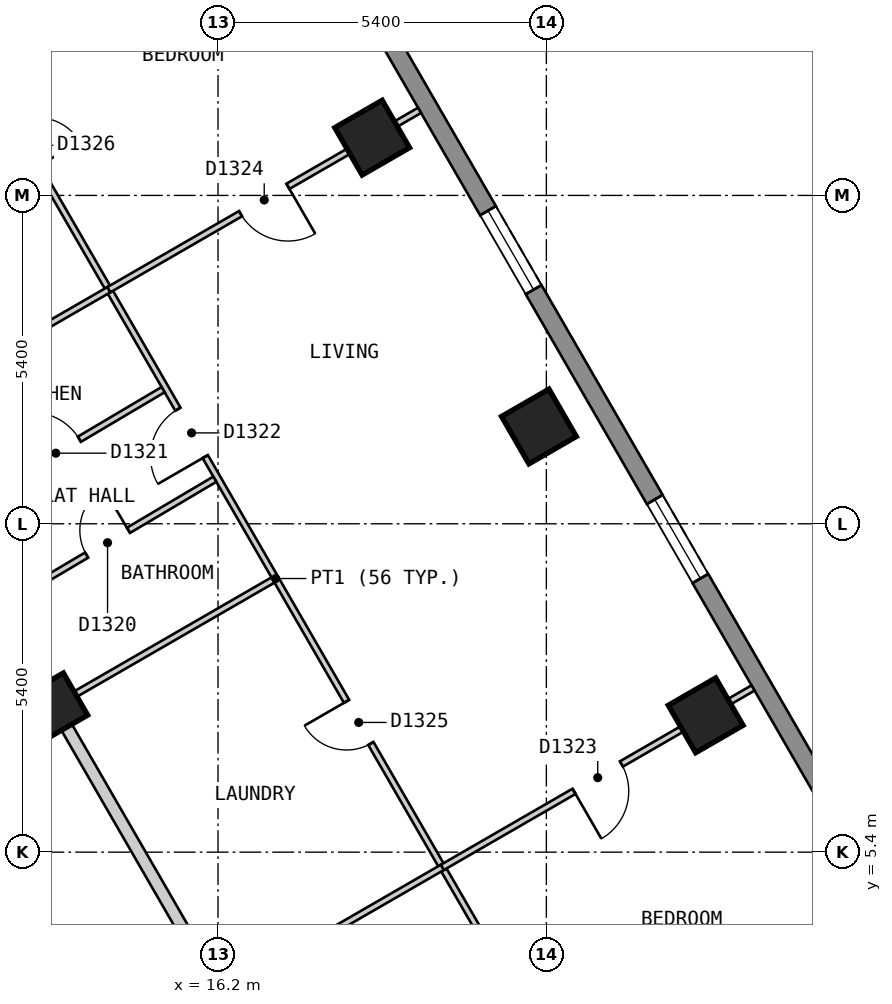
"""IFC4 building model, lengths in metres.
Left out: names, types, materials, properties, quantities, classifications, styles, units other than length and angle.
Written with IfcOpenShell. Run it as: python <this file> out.ifc"""

import sys

from ifc_helpers import new_model, si_unit, direction, frame, frame_2d, origin, origin_2d, place, context, subcontext, project, spatial, polyline, rectangle, outline, extrude, element, fill, save


model = new_model("IFC4")
c1 = context("Model", 3, precision=1e-05, world=origin(), true_north=direction((0.0, 1.0)))
c2 = subcontext(c1, "Body", "Model", "MODEL_VIEW")
j1 = project(units=[si_unit("LENGTHUNIT", "METRE"), si_unit("PLANEANGLEUNIT", "RADIAN")], contexts=[c1])
p1 = place(None, origin())
s1 = spatial("IfcSite", under=j1, at=p1, CompositionType="ELEMENT")
p2 = place(p1, origin())
s2 = spatial("IfcBuilding", under=s1, at=p2, CompositionType="ELEMENT")
p3 = place(p2, frame((0.0, 0.0, 147.6)))
s3 = spatial("IfcBuildingStorey", under=s2, at=p3, CompositionType="ELEMENT", Elevation=147.6)
for number, where, z_axis, x_axis in (
    (1, (24.22, 7.65, 0.0), (0.0, 0.0, 1.0), (-0.5, 0.866, 0.0)),
    (2, (21.478, 12.4, 0.0), (0.0, 0.0, 1.0), (-0.5, 0.866, 0.0)),
    (3, (18.735, 17.15, 0.0), (0.0, 0.0, 1.0), (-0.5, 0.866, 0.0)),
):
    element("IfcColumn", number, at=place(p3, frame(where, z_axis=z_axis, x_axis=x_axis)), inside=s3, PredefinedType="COLUMN", context=c2, shape_type="SweptSolid", body=[
        extrude(rectangle(XDim=0.9, YDim=0.9, at=origin_2d()), origin(), (0.0, 0.0, 1.0), 3.0),
    ])
p4 = place(p3, frame((13.51, 7.8, 0.0), z_axis=(0.0, 0.0, 1.0), x_axis=(-0.5, 0.866025403784, 0.0)))
e4 = element("IfcColumn", 4, at=p4, inside=s3, PredefinedType="COLUMN", context=c2, shape_type="SweptSolid", body=[
    extrude(rectangle(XDim=0.8, YDim=0.8, at=origin_2d()), origin(), (0.0, 0.0, 1.0), 3.0),
])
p5 = place(p3, frame((28.218, 2.825, 0.0), z_axis=(0.0, 0.0, 1.0), x_axis=(-0.500020536353, 0.866013546791, 0.0)))
e5 = element("IfcWall", 5, at=p5, inside=s3, PredefinedType="SOLIDWALL", context=c2, shape_type="SweptSolid", body=[
    extrude(outline(polyline([(0.0, -0.15), (23.325, -0.15), (23.245, 0.15), (0.08, 0.15), (0.0, -0.15)])), origin(), (0.0, 0.0, 1.0), 2.7),
])
p6 = place(p5, frame((2.685, 0.0, 0.15)))
e6 = element("IfcOpeningElement", 6, at=p6, cuts=e5, PredefinedType="OPENING", context=c2, shape_type="SweptSolid", body=[
    extrude(rectangle(XDim=1.5, YDim=2.1, at=frame_2d((0.75, 1.05))), frame((0.0, 0.16, 0.0), z_axis=(0.0, -1.0, 0.0), x_axis=(1.0, 0.0, 0.0)), (0.0, 0.0, 1.0), 0.32),
])
p7 = place(p5, frame((8.17, 0.0, 0.15)))
e7 = element("IfcOpeningElement", 7, at=p7, cuts=e5, PredefinedType="OPENING", context=c2, shape_type="SweptSolid", body=[
    extrude(rectangle(XDim=1.5, YDim=2.1, at=frame_2d((0.75, 1.05))), frame((0.0, 0.16, 0.0), z_axis=(0.0, -1.0, 0.0), x_axis=(1.0, 0.0, 0.0)), (0.0, 0.0, 1.0), 0.32),
])
p8 = place(p5, frame((13.655, 0.0, 0.15)))
e8 = element("IfcOpeningElement", 8, at=p8, cuts=e5, PredefinedType="OPENING", context=c2, shape_type="SweptSolid", body=[
    extrude(rectangle(XDim=1.5, YDim=2.1, at=frame_2d((0.75, 1.05))), frame((0.0, 0.16, 0.0), z_axis=(0.0, -1.0, 0.0), x_axis=(1.0, 0.0, 0.0)), (0.0, 0.0, 1.0), 0.32),
])
p9 = place(p5, frame((19.14, 0.0, 0.15)))
e9 = element("IfcOpeningElement", 9, at=p9, cuts=e5, PredefinedType="OPENING", context=c2, shape_type="SweptSolid", body=[
    extrude(rectangle(XDim=1.5, YDim=2.1, at=frame_2d((0.75, 1.05))), frame((0.0, 0.16, 0.0), z_axis=(0.0, -1.0, 0.0), x_axis=(1.0, 0.0, 0.0)), (0.0, 0.0, 1.0), 0.32),
])
p10 = place(p3, frame((7.967, 13.0, 0.0), z_axis=(0.0, 0.0, 1.0), x_axis=(0.50003774998, -0.866003607726, 0.0)))
e10 = element("IfcWall", 10, at=p10, inside=s3, PredefinedType="PARTITIONING", context=c2, shape_type="SweptSolid", body=[
    extrude(rectangle(XDim=14.433, YDim=0.2, at=frame_2d((7.217, 0.0))), origin(), (0.0, 0.0, 1.0), 2.7),
])
p11 = place(p10, frame((6.824, 0.0, 0.0)))
e11 = element("IfcOpeningElement", 11, at=p11, cuts=e10, PredefinedType="OPENING", context=c2, shape_type="SweptSolid", body=[
    extrude(rectangle(XDim=0.9, YDim=2.1, at=frame_2d((0.45, 1.05))), frame((0.0, 0.11, 0.0), z_axis=(0.0, -1.0, 0.0), x_axis=(1.0, 0.0, 0.0)), (0.0, 0.0, 1.0), 0.22),
])
p12 = place(p3, frame((9.296, 15.1, 0.0), z_axis=(0.0, 0.0, 1.0), x_axis=(0.499974024244, -0.866040400375, 0.0)))
e12 = element("IfcWall", 12, at=p12, inside=s3, PredefinedType="PARTITIONING", context=c2, shape_type="SweptSolid", body=[
    extrude(rectangle(XDim=16.857, YDim=0.2, at=frame_2d((8.429, 0.0))), origin(), (0.0, 0.0, 1.0), 2.7),
])
p13 = place(p12, frame((5.209, 0.0, 0.0)))
e13 = element("IfcOpeningElement", 13, at=p13, cuts=e12, PredefinedType="OPENING", context=c2, shape_type="SweptSolid", body=[
    extrude(rectangle(XDim=1.0, YDim=2.1, at=frame_2d((0.5, 1.05))), frame((0.0, 0.11, 0.0), z_axis=(0.0, -1.0, 0.0), x_axis=(1.0, 0.0, 0.0)), (0.0, 0.0, 1.0), 0.22),
])
p14 = place(p3, frame((11.713, 19.313, 0.0), z_axis=(0.0, 0.0, 1.0), x_axis=(0.499999523185, -0.866025679073, 0.0)))
e14 = element("IfcWall", 14, at=p14, inside=s3, PredefinedType="PARTITIONING", context=c2, shape_type="SweptSolid", body=[
    extrude(rectangle(XDim=21.738, YDim=0.1, at=frame_2d((10.869, 0.0))), origin(), (0.0, 0.0, 1.0), 2.7),
])
p15 = place(p14, frame((7.654, 0.0, 0.0)))
e15 = element("IfcOpeningElement", 15, at=p15, cuts=e14, PredefinedType="OPENING", context=c2, shape_type="SweptSolid", body=[
    extrude(rectangle(XDim=0.9, YDim=2.1, at=frame_2d((0.45, 1.05))), frame((0.0, 0.06, 0.0), z_axis=(0.0, -1.0, 0.0), x_axis=(1.0, 0.0, 0.0)), (0.0, 0.0, 1.0), 0.12),
])
p16 = place(p14, frame((13.202, 0.0, 0.0)))
e16 = element("IfcOpeningElement", 16, at=p16, cuts=e14, PredefinedType="OPENING", context=c2, shape_type="SweptSolid", body=[
    extrude(rectangle(XDim=0.8, YDim=2.1, at=frame_2d((0.4, 1.05))), frame((0.0, 0.06, 0.0), z_axis=(0.0, -1.0, 0.0), x_axis=(1.0, 0.0, 0.0)), (0.0, 0.0, 1.0), 0.12),
])
p17 = place(p14, frame((2.242, 0.0, 0.0)))
e17 = element("IfcOpeningElement", 17, at=p17, cuts=e14, PredefinedType="OPENING", context=c2, shape_type="SweptSolid", body=[
    extrude(rectangle(XDim=0.8, YDim=2.1, at=frame_2d((0.4, 1.05))), frame((0.0, 0.06, 0.0), z_axis=(0.0, -1.0, 0.0), x_axis=(1.0, 0.0, 0.0)), (0.0, 0.0, 1.0), 0.12),
])
p18 = place(p14, frame((18.696, 0.0, 0.0)))
e18 = element("IfcOpeningElement", 18, at=p18, cuts=e14, PredefinedType="OPENING", context=c2, shape_type="SweptSolid", body=[
    extrude(rectangle(XDim=0.8, YDim=2.1, at=frame_2d((0.4, 1.05))), frame((0.0, 0.06, 0.0), z_axis=(0.0, -1.0, 0.0), x_axis=(1.0, 0.0, 0.0)), (0.0, 0.0, 1.0), 0.12),
])
p19 = place(p3, frame((16.339, 3.1, 0.0), z_axis=(0.0, 0.0, 1.0), x_axis=(0.866050731258, 0.499956128963, 0.0)))
e19 = element("IfcWall", 19, at=p19, inside=s3, PredefinedType="PARTITIONING", context=c2, shape_type="SweptSolid", body=[
    extrude(rectangle(XDim=4.1, YDim=0.1, at=frame_2d((2.05, 0.0))), origin(), (0.0, 0.0, 1.0), 2.7),
])
p20 = place(p3, frame((13.597, 7.85, 0.0), z_axis=(0.0, 0.0, 1.0), x_axis=(0.866015917575, 0.500016430238, 0.0)))
e20 = element("IfcWall", 20, at=p20, inside=s3, PredefinedType="PARTITIONING", context=c2, shape_type="SweptSolid", body=[
    extrude(rectangle(XDim=4.05, YDim=0.1, at=frame_2d((2.025, 0.0))), origin(), (0.0, 0.0, 1.0), 2.7),
])
p21 = place(p3, frame((10.854, 12.6, 0.0), z_axis=(0.0, 0.0, 1.0), x_axis=(0.86606561423, 0.499930346997, 0.0)))
e21 = element("IfcWall", 21, at=p21, inside=s3, PredefinedType="PARTITIONING", context=c2, shape_type="SweptSolid", body=[
    extrude(rectangle(XDim=4.1, YDim=0.1, at=frame_2d((2.05, 0.0))), origin(), (0.0, 0.0, 1.0), 2.7),
])
p22 = place(p3, frame((11.812, 10.942, 0.0), z_axis=(0.0, 0.0, 1.0), x_axis=(0.860404104761, 0.509612378687, 0.0)))
e22 = element("IfcWall", 22, at=p22, inside=s3, PredefinedType="PARTITIONING", context=c2, shape_type="SweptSolid", body=[
    extrude(rectangle(XDim=4.051, YDim=0.1, at=frame_2d((2.025, 0.0))), origin(), (0.0, 0.0, 1.0), 2.7),
])
p23 = place(p22, frame((1.55, 0.0, 0.0)))
e23 = element("IfcOpeningElement", 23, at=p23, cuts=e22, PredefinedType="OPENING", context=c2, shape_type="SweptSolid", body=[
    extrude(rectangle(XDim=0.9, YDim=2.1, at=frame_2d((0.45, 1.05))), frame((0.0, 0.06, 0.0), z_axis=(0.0, -1.0, 0.0), x_axis=(1.0, 0.0, 0.0)), (0.0, 0.0, 1.0), 0.12),
])
p24 = place(p3, frame((12.662, 9.47, 0.0), z_axis=(0.0, 0.0, 1.0), x_axis=(0.860520594262, 0.509415652341, 0.0)))
e24 = element("IfcWall", 24, at=p24, inside=s3, PredefinedType="PARTITIONING", context=c2, shape_type="SweptSolid", body=[
    extrude(rectangle(XDim=4.05, YDim=0.1, at=frame_2d((2.025, 0.0))), origin(), (0.0, 0.0, 1.0), 2.7),
])
p25 = place(p24, frame((1.6, 0.0, 0.0)))
e25 = element("IfcOpeningElement", 25, at=p25, cuts=e24, PredefinedType="OPENING", context=c2, shape_type="SweptSolid", body=[
    extrude(rectangle(XDim=0.8, YDim=2.1, at=frame_2d((0.4, 1.05))), frame((0.0, 0.06, 0.0), z_axis=(0.0, -1.0, 0.0), x_axis=(1.0, 0.0, 0.0)), (0.0, 0.0, 1.0), 0.12),
])
p26 = place(p3, frame((19.89, 5.15, 0.0), z_axis=(0.0, 0.0, 1.0), x_axis=(0.865993310977, 0.500055582255, 0.0)))
e26 = element("IfcWall", 26, at=p26, inside=s3, PredefinedType="PARTITIONING", context=c2, shape_type="SweptSolid", body=[
    extrude(rectangle(XDim=5.9, YDim=0.1, at=frame_2d((2.95, 0.0))), origin(), (0.0, 0.0, 1.0), 2.7),
])
p27 = place(p26, frame((2.5, 0.0, 0.0)))
e27 = element("IfcOpeningElement", 27, at=p27, cuts=e26, PredefinedType="OPENING", context=c2, shape_type="SweptSolid", body=[
    extrude(rectangle(XDim=0.9, YDim=2.1, at=frame_2d((0.45, 1.05))), frame((0.0, 0.06, 0.0), z_axis=(0.0, -1.0, 0.0), x_axis=(1.0, 0.0, 0.0)), (0.0, 0.0, 1.0), 0.12),
])
p28 = place(p3, frame((14.405, 14.65, 0.0), z_axis=(0.0, 0.0, 1.0), x_axis=(0.866054644421, 0.499949350311, 0.0)))
e28 = element("IfcWall", 28, at=p28, inside=s3, PredefinedType="PARTITIONING", context=c2, shape_type="SweptSolid", body=[
    extrude(rectangle(XDim=5.899, YDim=0.1, at=frame_2d((2.949, 0.0))), origin(), (0.0, 0.0, 1.0), 2.7),
])
p29 = place(p28, frame((2.5, 0.0, 0.0)))
e29 = element("IfcOpeningElement", 29, at=p29, cuts=e28, PredefinedType="OPENING", context=c2, shape_type="SweptSolid", body=[
    extrude(rectangle(XDim=0.9, YDim=2.1, at=frame_2d((0.45, 1.05))), frame((0.0, 0.06, 0.0), z_axis=(0.0, -1.0, 0.0), x_axis=(1.0, 0.0, 0.0)), (0.0, 0.0, 1.0), 0.12),
])
p30 = place(p7, origin())
e30 = element("IfcWindow", 30, at=p30, inside=s3, PartitioningType="SINGLE_PANEL", PredefinedType="WINDOW", context=c2, shape_type="SweptSolid", body=[
    extrude(rectangle(XDim=1.5, YDim=2.1, at=frame_2d((0.75, 1.05))), frame((0.0, 0.03, 0.0), z_axis=(0.0, -1.0, 0.0), x_axis=(1.0, 0.0, 0.0)), (0.0, 0.0, 1.0), 0.06),
])
fill(e7, e30)
p31 = place(p8, origin())
e31 = element("IfcWindow", 31, at=p31, inside=s3, PartitioningType="SINGLE_PANEL", PredefinedType="WINDOW", context=c2, shape_type="SweptSolid", body=[
    extrude(rectangle(XDim=1.5, YDim=2.1, at=frame_2d((0.75, 1.05))), frame((0.0, 0.03, 0.0), z_axis=(0.0, -1.0, 0.0), x_axis=(1.0, 0.0, 0.0)), (0.0, 0.0, 1.0), 0.06),
])
fill(e8, e31)
p32 = place(p25, origin())
e32 = element("IfcDoor", 32, at=p32, inside=s3, OperationType="SINGLE_SWING_RIGHT", PredefinedType="DOOR", context=c2, shape_type="SweptSolid", body=[
    extrude(rectangle(XDim=0.8, YDim=2.1, at=frame_2d((0.4, 1.05))), frame((0.0, 0.025, 0.0), z_axis=(0.0, -1.0, 0.0), x_axis=(1.0, 0.0, 0.0)), (0.0, 0.0, 1.0), 0.05),
])
fill(e25, e32)
p33 = place(p23, origin())
e33 = element("IfcDoor", 33, at=p33, inside=s3, OperationType="SINGLE_SWING_LEFT", PredefinedType="DOOR", context=c2, shape_type="SweptSolid", body=[
    extrude(rectangle(XDim=0.9, YDim=2.1, at=frame_2d((0.45, 1.05))), frame((0.0, 0.025, 0.0), z_axis=(0.0, -1.0, 0.0), x_axis=(1.0, 0.0, 0.0)), (0.0, 0.0, 1.0), 0.05),
])
fill(e23, e33)
p34 = place(p15, origin())
e34 = element("IfcDoor", 34, at=p34, inside=s3, OperationType="SINGLE_SWING_RIGHT", PredefinedType="DOOR", context=c2, shape_type="SweptSolid", body=[
    extrude(rectangle(XDim=0.9, YDim=2.1, at=frame_2d((0.45, 1.05))), frame((0.0, 0.025, 0.0), z_axis=(0.0, -1.0, 0.0), x_axis=(1.0, 0.0, 0.0)), (0.0, 0.0, 1.0), 0.05),
])
fill(e15, e34)
p35 = place(p27, origin())
e35 = element("IfcDoor", 35, at=p35, inside=s3, OperationType="SINGLE_SWING_LEFT", PredefinedType="DOOR", context=c2, shape_type="SweptSolid", body=[
    extrude(rectangle(XDim=0.9, YDim=2.1, at=frame_2d((0.45, 1.05))), frame((0.0, 0.025, 0.0), z_axis=(0.0, -1.0, 0.0), x_axis=(1.0, 0.0, 0.0)), (0.0, 0.0, 1.0), 0.05),
])
fill(e27, e35)
p36 = place(p29, origin())
e36 = element("IfcDoor", 36, at=p36, inside=s3, OperationType="SINGLE_SWING_RIGHT", PredefinedType="DOOR", context=c2, shape_type="SweptSolid", body=[
    extrude(rectangle(XDim=0.9, YDim=2.1, at=frame_2d((0.45, 1.05))), frame((0.0, 0.025, 0.0), z_axis=(0.0, -1.0, 0.0), x_axis=(1.0, 0.0, 0.0)), (0.0, 0.0, 1.0), 0.05),
])
fill(e29, e36)
p37 = place(p16, origin())
e37 = element("IfcDoor", 37, at=p37, inside=s3, OperationType="SINGLE_SWING_LEFT", PredefinedType="DOOR", context=c2, shape_type="SweptSolid", body=[
    extrude(rectangle(XDim=0.8, YDim=2.1, at=frame_2d((0.4, 1.05))), frame((0.0, 0.025, 0.0), z_axis=(0.0, -1.0, 0.0), x_axis=(1.0, 0.0, 0.0)), (0.0, 0.0, 1.0), 0.05),
])
fill(e16, e37)
save(model, sys.argv[1])
